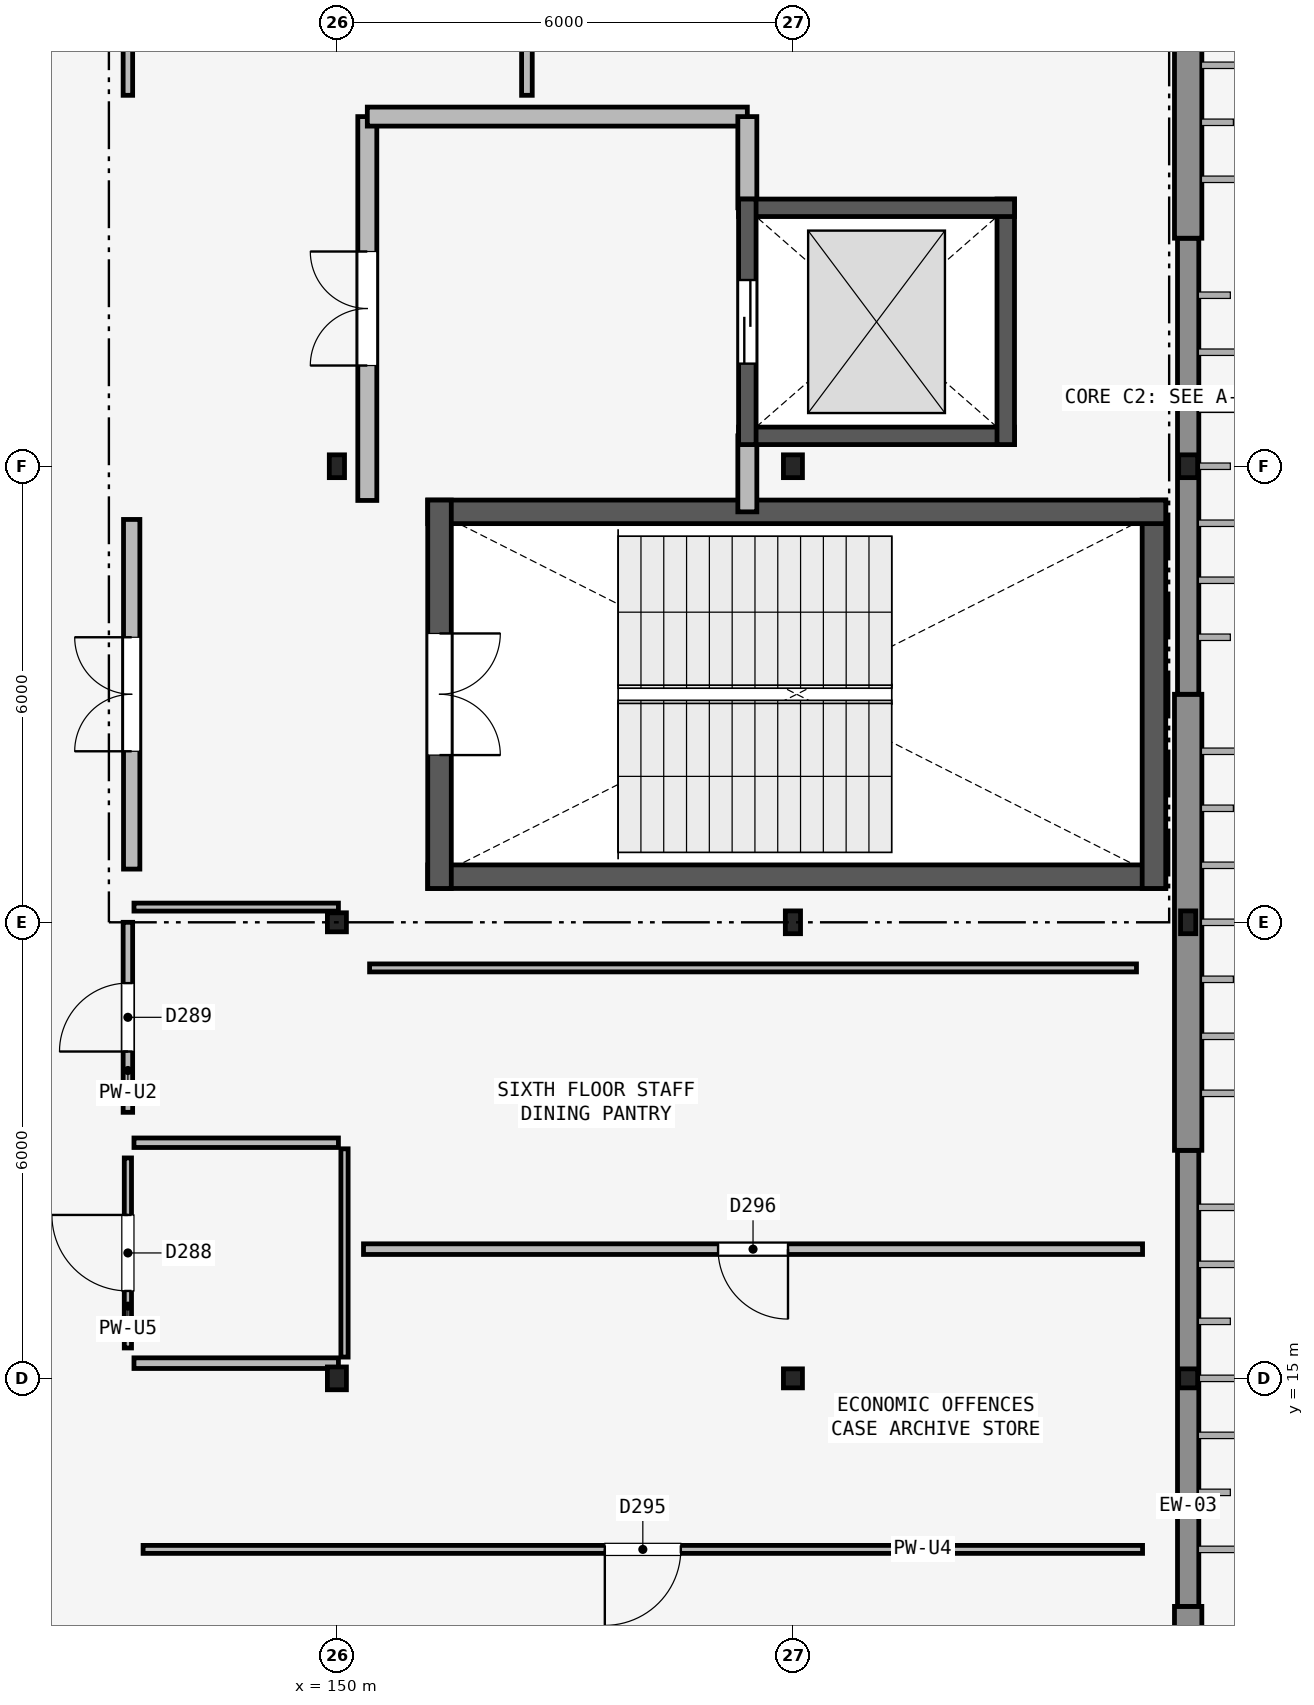
"""IFC4 building model, lengths in metres.
Left out: names, types, materials, properties, quantities, classifications, styles, units other than length and angle.
Written with IfcOpenShell. Run it as: python <this file> out.ifc"""

import sys

from ifc_helpers import new_model, si_unit, direction, frame, frame_2d, origin, origin_2d, place, context, subcontext, project, spatial, rectangle, hollow_rectangle, i_section, extrude, element, fill, save


model = new_model("IFC4")
c1 = context("Model", 3, precision=1e-05, world=origin(), true_north=direction((0.0, 1.0)))
c2 = subcontext(c1, "Body", "Model", "MODEL_VIEW")
j1 = project(units=[si_unit("LENGTHUNIT", "METRE"), si_unit("PLANEANGLEUNIT", "RADIAN")], contexts=[c1])
p1 = place(None, origin())
s1 = spatial("IfcSite", under=j1, at=p1, CompositionType="ELEMENT")
p2 = place(p1, origin())
s2 = spatial("IfcBuilding", under=s1, at=p2, CompositionType="ELEMENT")
p3 = place(p2, frame((0.0, 0.0, 26.1)))
s3 = spatial("IfcBuildingStorey", under=s2, at=p3, CompositionType="ELEMENT", Elevation=26.1)
p4 = place(p3, frame((150.0, 15.0, 0.0), z_axis=(0.0, 0.0, 1.0), x_axis=(1.0, 0.0, 0.0)))
e1 = element("IfcColumn", 1, at=p4, inside=s3, PredefinedType="COLUMN", context=c2, shape_type="SweptSolid", body=[
    extrude(i_section(OverallWidth=0.25, OverallDepth=0.3, WebThickness=0.01, FlangeThickness=0.01, FilletRadius=0.012, at=origin_2d()), origin(), (0.0, 0.0, 1.0), 3.9),
])
p5 = place(p3, frame((150.0, 21.0, 0.0), z_axis=(0.0, 0.0, 1.0), x_axis=(1.0, 0.0, 0.0)))
e2 = element("IfcColumn", 2, at=p5, inside=s3, PredefinedType="COLUMN", context=c2, shape_type="SweptSolid", body=[
    extrude(hollow_rectangle(XDim=0.25, YDim=0.25, WallThickness=0.012, InnerFilletRadius=0.012, OuterFilletRadius=0.024, at=origin_2d()), origin(), (0.0, 0.0, 1.0), 3.9),
])
p6 = place(p3, frame((150.0, 27.0, 0.0), z_axis=(0.0, 0.0, 1.0), x_axis=(1.0, 0.0, 0.0)))
e3 = element("IfcColumn", 3, at=p6, inside=s3, PredefinedType="COLUMN", context=c2, shape_type="SweptSolid", body=[
    extrude(hollow_rectangle(XDim=0.2, YDim=0.3, WallThickness=0.012, InnerFilletRadius=0.012, OuterFilletRadius=0.024, at=origin_2d()), origin(), (0.0, 0.0, 1.0), 3.9),
])
p7 = place(p3, frame((156.0, 15.0, 0.0), z_axis=(0.0, 0.0, 1.0), x_axis=(1.0, 0.0, 0.0)))
e4 = element("IfcColumn", 4, at=p7, inside=s3, PredefinedType="COLUMN", context=c2, shape_type="SweptSolid", body=[
    extrude(hollow_rectangle(XDim=0.25, YDim=0.25, WallThickness=0.012, InnerFilletRadius=0.012, OuterFilletRadius=0.024, at=origin_2d()), origin(), (0.0, 0.0, 1.0), 3.9),
])
p8 = place(p3, frame((156.0, 21.0, 0.0), z_axis=(0.0, 0.0, 1.0), x_axis=(1.0, 0.0, 0.0)))
e5 = element("IfcColumn", 5, at=p8, inside=s3, PredefinedType="COLUMN", context=c2, shape_type="SweptSolid", body=[
    extrude(hollow_rectangle(XDim=0.2, YDim=0.3, WallThickness=0.012, InnerFilletRadius=0.012, OuterFilletRadius=0.024, at=origin_2d()), origin(), (0.0, 0.0, 1.0), 3.9),
])
p9 = place(p3, frame((156.0, 27.0, 0.0), z_axis=(0.0, 0.0, 1.0), x_axis=(1.0, 0.0, 0.0)))
e6 = element("IfcColumn", 6, at=p9, inside=s3, PredefinedType="COLUMN", context=c2, shape_type="SweptSolid", body=[
    extrude(i_section(OverallWidth=0.25, OverallDepth=0.3, WebThickness=0.01, FlangeThickness=0.01, FilletRadius=0.012, at=origin_2d()), origin(), (0.0, 0.0, 1.0), 3.9),
])
p10 = place(p3, frame((161.2, 15.0, 0.0), z_axis=(0.0, 0.0, 1.0), x_axis=(1.0, 0.0, 0.0)))
e7 = element("IfcColumn", 7, at=p10, inside=s3, PredefinedType="COLUMN", context=c2, shape_type="SweptSolid", body=[
    extrude(hollow_rectangle(XDim=0.25, YDim=0.25, WallThickness=0.012, InnerFilletRadius=0.012, OuterFilletRadius=0.024, at=origin_2d()), origin(), (0.0, 0.0, 1.0), 3.9),
])
p11 = place(p3, frame((161.2, 21.0, 0.0), z_axis=(0.0, 0.0, 1.0), x_axis=(1.0, 0.0, 0.0)))
e8 = element("IfcColumn", 8, at=p11, inside=s3, PredefinedType="COLUMN", context=c2, shape_type="SweptSolid", body=[
    extrude(hollow_rectangle(XDim=0.2, YDim=0.3, WallThickness=0.012, InnerFilletRadius=0.012, OuterFilletRadius=0.024, at=origin_2d()), origin(), (0.0, 0.0, 1.0), 3.9),
])
p12 = place(p3, frame((161.2, 27.0, 0.0), z_axis=(0.0, 0.0, 1.0), x_axis=(1.0, 0.0, 0.0)))
e9 = element("IfcColumn", 9, at=p12, inside=s3, PredefinedType="COLUMN", context=c2, shape_type="SweptSolid", body=[
    extrude(i_section(OverallWidth=0.25, OverallDepth=0.3, WebThickness=0.01, FlangeThickness=0.01, FilletRadius=0.012, at=origin_2d()), origin(), (0.0, 0.0, 1.0), 3.9),
])
p13 = place(p3, frame((161.2, 6.0, 0.0), z_axis=(0.0, 0.0, 1.0), x_axis=(0.0, 1.0, 0.0)))
e10 = element("IfcWall", 10, at=p13, inside=s3, PredefinedType="SOLIDWALL", context=c2, shape_type="SweptSolid", body=[
    extrude(rectangle(XDim=6.0, YDim=0.36, at=frame_2d((3.0, 0.0))), origin(), (0.0, 0.0, 1.0), 3.13),
])
p14 = place(p3, frame((161.2, 12.0, 0.0), z_axis=(0.0, 0.0, 1.0), x_axis=(0.0, 1.0, 0.0)))
e11 = element("IfcWall", 11, at=p14, inside=s3, PredefinedType="SOLIDWALL", context=c2, shape_type="SweptSolid", body=[
    extrude(rectangle(XDim=6.0, YDim=0.28, at=frame_2d((3.0, 0.0))), origin(), (0.0, 0.0, 1.0), 3.13),
])
p15 = place(p3, frame((161.2, 18.0, 0.0), z_axis=(0.0, 0.0, 1.0), x_axis=(0.0, 1.0, 0.0)))
e12 = element("IfcWall", 12, at=p15, inside=s3, PredefinedType="SOLIDWALL", context=c2, shape_type="SweptSolid", body=[
    extrude(rectangle(XDim=6.0, YDim=0.36, at=frame_2d((3.0, 0.0))), origin(), (0.0, 0.0, 1.0), 3.13),
])
p16 = place(p3, frame((161.2, 24.0, 0.0), z_axis=(0.0, 0.0, 1.0), x_axis=(0.0, 1.0, 0.0)))
e13 = element("IfcWall", 13, at=p16, inside=s3, PredefinedType="SOLIDWALL", context=c2, shape_type="SweptSolid", body=[
    extrude(rectangle(XDim=6.0, YDim=0.28, at=frame_2d((3.0, 0.0))), origin(), (0.0, 0.0, 1.0), 3.13),
])
p17 = place(p3, frame((161.2, 30.0, 0.0), z_axis=(0.0, 0.0, 1.0), x_axis=(0.0, 1.0, 0.0)))
e14 = element("IfcWall", 14, at=p17, inside=s3, PredefinedType="SOLIDWALL", context=c2, shape_type="SweptSolid", body=[
    extrude(rectangle(XDim=3.8, YDim=0.36, at=frame_2d((1.9, 0.0))), origin(), (0.0, 0.0, 1.0), 3.13),
])
p18 = place(p3, frame((151.195, 21.6, 0.0), z_axis=(0.0, 0.0, 1.0), x_axis=(1.0, 0.0, 0.0)))
e15 = element("IfcWall", 15, at=p18, inside=s3, PredefinedType="SHEAR", context=c2, shape_type="SweptSolid", body=[
    extrude(rectangle(XDim=9.71, YDim=0.31, at=frame_2d((4.855, 0.0))), origin(), (0.0, 0.0, 1.0), 3.76),
])
p19 = place(p3, frame((160.75, 21.445, 0.0), z_axis=(0.0, 0.0, 1.0), x_axis=(0.0, 1.0, 0.0)))
e16 = element("IfcWall", 16, at=p19, inside=s3, PredefinedType="SHEAR", context=c2, shape_type="SweptSolid", body=[
    extrude(rectangle(XDim=5.11, YDim=0.31, at=frame_2d((2.555, 0.0))), origin(), (0.0, 0.0, 1.0), 3.76),
])
p20 = place(p3, frame((160.905, 26.4, 0.0), z_axis=(0.0, 0.0, 1.0), x_axis=(-1.0, 0.0, 0.0)))
e17 = element("IfcWall", 17, at=p20, inside=s3, PredefinedType="SHEAR", context=c2, shape_type="SweptSolid", body=[
    extrude(rectangle(XDim=9.71, YDim=0.31, at=frame_2d((4.855, 0.0))), origin(), (0.0, 0.0, 1.0), 3.76),
])
p21 = place(p3, frame((151.35, 26.555, 0.0), z_axis=(0.0, 0.0, 1.0), x_axis=(0.0, -1.0, 0.0)))
e18 = element("IfcWall", 18, at=p21, inside=s3, PredefinedType="SHEAR", context=c2, shape_type="SweptSolid", body=[
    extrude(rectangle(XDim=5.11, YDim=0.31, at=frame_2d((2.555, 0.0))), origin(), (0.0, 0.0, 1.0), 3.76),
])
p22 = place(p21, frame((1.755, 0.0, 0.0)))
e19 = element("IfcOpeningElement", 19, at=p22, cuts=e18, PredefinedType="OPENING", context=c2, shape_type="SweptSolid", body=[
    extrude(rectangle(XDim=1.6, YDim=2.2, at=frame_2d((0.8, 1.1))), frame((0.0, 0.165, 0.0), z_axis=(0.0, -1.0, 0.0), x_axis=(1.0, 0.0, 0.0)), (0.0, 0.0, 1.0), 0.33),
])
p23 = place(p3, frame((147.3, 21.7, 0.0), z_axis=(0.0, 0.0, 1.0), x_axis=(0.0, 1.0, 0.0)))
e20 = element("IfcWall", 20, at=p23, inside=s3, PredefinedType="PARTITIONING", context=c2, shape_type="SweptSolid", body=[
    extrude(rectangle(XDim=4.6, YDim=0.215, at=frame_2d((2.3, 0.0))), origin(), (0.0, 0.0, 1.0), 3.68),
])
p24 = place(p23, frame((1.55, 0.0, 0.0)))
e21 = element("IfcOpeningElement", 21, at=p24, cuts=e20, PredefinedType="OPENING", context=c2, shape_type="SweptSolid", body=[
    extrude(rectangle(XDim=1.5, YDim=2.15, at=frame_2d((0.75, 1.075))), frame((0.0, 0.117, 0.0), z_axis=(0.0, -1.0, 0.0), x_axis=(1.0, 0.0, 0.0)), (0.0, 0.0, 1.0), 0.235),
])
p25 = place(p3, frame((150.4, 26.55, 0.0), z_axis=(0.0, 0.0, 1.0), x_axis=(0.0, 1.0, 0.0)))
e22 = element("IfcWall", 22, at=p25, inside=s3, PredefinedType="PARTITIONING", context=c2, shape_type="SweptSolid", body=[
    extrude(rectangle(XDim=5.05, YDim=0.25, at=frame_2d((2.525, 0.0))), origin(), (0.0, 0.0, 1.0), 3.08),
])
p26 = place(p25, frame((1.775, 0.0, 0.0)))
e23 = element("IfcOpeningElement", 23, at=p26, cuts=e22, PredefinedType="OPENING", context=c2, shape_type="SweptSolid", body=[
    extrude(rectangle(XDim=1.5, YDim=2.15, at=frame_2d((0.75, 1.075))), frame((0.0, 0.135, 0.0), z_axis=(0.0, -1.0, 0.0), x_axis=(1.0, 0.0, 0.0)), (0.0, 0.0, 1.0), 0.27),
])
p27 = place(p3, frame((150.4, 31.6, 0.0), z_axis=(0.0, 0.0, 1.0), x_axis=(1.0, 0.0, 0.0)))
e24 = element("IfcWall", 24, at=p27, inside=s3, PredefinedType="PARTITIONING", context=c2, shape_type="SweptSolid", body=[
    extrude(rectangle(XDim=5.0, YDim=0.25, at=frame_2d((2.5, 0.0))), origin(), (0.0, 0.0, 1.0), 3.28),
])
p28 = place(p3, frame((155.4, 30.4, 0.0), z_axis=(0.0, 0.0, 1.0), x_axis=(0.0, 1.0, 0.0)))
e25 = element("IfcWall", 25, at=p28, inside=s3, PredefinedType="PARTITIONING", context=c2, shape_type="SweptSolid", body=[
    extrude(rectangle(XDim=1.2, YDim=0.25, at=frame_2d((0.6, 0.0))), origin(), (0.0, 0.0, 1.0), 3.68),
])
p29 = place(p3, frame((155.4, 26.4, 0.0), z_axis=(0.0, 0.0, 1.0), x_axis=(0.0, 1.0, 0.0)))
e26 = element("IfcWall", 26, at=p29, inside=s3, PredefinedType="PARTITIONING", context=c2, shape_type="SweptSolid", body=[
    extrude(rectangle(XDim=1.0, YDim=0.25, at=frame_2d((0.5, 0.0))), origin(), (0.0, 0.0, 1.0), 3.08),
])
p30 = place(p3, frame((155.285, 27.4, 0.0), z_axis=(0.0, 0.0, 1.0), x_axis=(1.0, 0.0, 0.0)))
e27 = element("IfcWall", 27, at=p30, inside=s3, PredefinedType="SHEAR", context=c2, shape_type="SweptSolid", body=[
    extrude(rectangle(XDim=3.63, YDim=0.23, at=frame_2d((1.815, 0.0))), origin(), (0.0, 0.0, 1.0), 3.9),
])
p31 = place(p3, frame((158.8, 27.285, 0.0), z_axis=(0.0, 0.0, 1.0), x_axis=(0.0, 1.0, 0.0)))
e28 = element("IfcWall", 28, at=p31, inside=s3, PredefinedType="SHEAR", context=c2, shape_type="SweptSolid", body=[
    extrude(rectangle(XDim=3.23, YDim=0.23, at=frame_2d((1.615, 0.0))), origin(), (0.0, 0.0, 1.0), 3.9),
])
p32 = place(p3, frame((158.915, 30.4, 0.0), z_axis=(0.0, 0.0, 1.0), x_axis=(-1.0, 0.0, 0.0)))
e29 = element("IfcWall", 29, at=p32, inside=s3, PredefinedType="SHEAR", context=c2, shape_type="SweptSolid", body=[
    extrude(rectangle(XDim=3.63, YDim=0.23, at=frame_2d((1.815, 0.0))), origin(), (0.0, 0.0, 1.0), 3.9),
])
p33 = place(p3, frame((155.4, 30.515, 0.0), z_axis=(0.0, 0.0, 1.0), x_axis=(0.0, -1.0, 0.0)))
e30 = element("IfcWall", 30, at=p33, inside=s3, PredefinedType="SHEAR", context=c2, shape_type="SweptSolid", body=[
    extrude(rectangle(XDim=3.23, YDim=0.23, at=frame_2d((1.615, 0.0))), origin(), (0.0, 0.0, 1.0), 3.9),
])
p34 = place(p33, frame((1.065, 0.0, 0.0)))
e31 = element("IfcOpeningElement", 31, at=p34, cuts=e30, PredefinedType="OPENING", context=c2, shape_type="SweptSolid", body=[
    extrude(rectangle(XDim=1.1, YDim=2.2, at=frame_2d((0.55, 1.1))), frame((0.0, 0.125, 0.0), z_axis=(0.0, -1.0, 0.0), x_axis=(1.0, 0.0, 0.0)), (0.0, 0.0, 1.0), 0.25),
])
p35 = place(p3, frame((147.25, 15.4, 0.0), z_axis=(0.0, 0.0, 1.0), x_axis=(0.0, 1.0, 0.0)))
e32 = element("IfcWall", 32, at=p35, inside=s3, PredefinedType="PARTITIONING", context=c2, shape_type="SweptSolid", body=[
    extrude(rectangle(XDim=2.5, YDim=0.095, at=frame_2d((1.25, 0.0))), origin(), (0.0, 0.0, 1.0), 3.68),
])
p36 = place(p35, frame((0.75, 0.0, 0.0)))
e33 = element("IfcOpeningElement", 33, at=p36, cuts=e32, PredefinedType="OPENING", context=c2, shape_type="SweptSolid", body=[
    extrude(rectangle(XDim=1.0, YDim=2.1, at=frame_2d((0.5, 1.05))), frame((0.0, 0.057, 0.0), z_axis=(0.0, -1.0, 0.0), x_axis=(1.0, 0.0, 0.0)), (0.0, 0.0, 1.0), 0.115),
])
p37 = place(p3, frame((147.25, 18.5, 0.0), z_axis=(0.0, 0.0, 1.0), x_axis=(0.0, 1.0, 0.0)))
e34 = element("IfcWall", 34, at=p37, inside=s3, PredefinedType="PARTITIONING", context=c2, shape_type="SweptSolid", body=[
    extrude(rectangle(XDim=2.5, YDim=0.125, at=frame_2d((1.25, 0.0))), origin(), (0.0, 0.0, 1.0), 3.18),
])
p38 = place(p37, frame((0.8, 0.0, 0.0)))
e35 = element("IfcOpeningElement", 35, at=p38, cuts=e34, PredefinedType="OPENING", context=c2, shape_type="SweptSolid", body=[
    extrude(rectangle(XDim=0.9, YDim=2.1, at=frame_2d((0.45, 1.05))), frame((0.0, 0.073, 0.0), z_axis=(0.0, -1.0, 0.0), x_axis=(1.0, 0.0, 0.0)), (0.0, 0.0, 1.0), 0.145),
])
p39 = place(p3, frame((160.6, 12.75, 0.0), z_axis=(0.0, 0.0, 1.0), x_axis=(-1.0, 0.0, 0.0)))
e36 = element("IfcWall", 36, at=p39, inside=s3, PredefinedType="PARTITIONING", context=c2, shape_type="SweptSolid", body=[
    extrude(rectangle(XDim=13.15, YDim=0.105, at=frame_2d((6.575, 0.0))), origin(), (0.0, 0.0, 1.0), 3.273),
])
p40 = place(p39, frame((6.075, 0.0, 0.0)))
e37 = element("IfcOpeningElement", 37, at=p40, cuts=e36, PredefinedType="OPENING", context=c2, shape_type="SweptSolid", body=[
    extrude(rectangle(XDim=1.0, YDim=2.15, at=frame_2d((0.5, 1.075))), frame((0.0, 0.062, 0.0), z_axis=(0.0, -1.0, 0.0), x_axis=(1.0, 0.0, 0.0)), (0.0, 0.0, 1.0), 0.125),
])
p41 = place(p3, frame((160.6, 16.7, 0.0), z_axis=(0.0, 0.0, 1.0), x_axis=(-1.0, 0.0, 0.0)))
e38 = element("IfcWall", 38, at=p41, inside=s3, PredefinedType="PARTITIONING", context=c2, shape_type="SweptSolid", body=[
    extrude(rectangle(XDim=10.25, YDim=0.14, at=frame_2d((5.125, 0.0))), origin(), (0.0, 0.0, 1.0), 3.33),
])
p42 = place(p41, frame((4.665, 0.0, 0.0)))
e39 = element("IfcOpeningElement", 39, at=p42, cuts=e38, PredefinedType="OPENING", context=c2, shape_type="SweptSolid", body=[
    extrude(rectangle(XDim=0.92, YDim=2.1, at=frame_2d((0.46, 1.05))), frame((0.0, 0.08, 0.0), z_axis=(0.0, -1.0, 0.0), x_axis=(1.0, 0.0, 0.0)), (0.0, 0.0, 1.0), 0.16),
])
p43 = place(p3, frame((150.1, 18.02, 0.0), z_axis=(0.0, 0.0, 1.0), x_axis=(0.0, -1.0, 0.0)))
e40 = element("IfcWall", 40, at=p43, inside=s3, PredefinedType="PARTITIONING", context=c2, shape_type="SweptSolid", body=[
    extrude(rectangle(XDim=2.74, YDim=0.095, at=frame_2d((1.37, 0.0))), origin(), (0.0, 0.0, 1.0), 3.273),
])
p44 = place(p3, frame((150.02, 15.2, 0.0), z_axis=(0.0, 0.0, 1.0), x_axis=(-1.0, 0.0, 0.0)))
e41 = element("IfcWall", 41, at=p44, inside=s3, PredefinedType="PARTITIONING", context=c2, shape_type="SweptSolid", body=[
    extrude(rectangle(XDim=2.69, YDim=0.14, at=frame_2d((1.345, 0.0))), origin(), (0.0, 0.0, 1.0), 3.08),
])
p45 = place(p3, frame((147.33, 18.1, 0.0), z_axis=(0.0, 0.0, 1.0), x_axis=(1.0, 0.0, 0.0)))
e42 = element("IfcWall", 42, at=p45, inside=s3, PredefinedType="PARTITIONING", context=c2, shape_type="SweptSolid", body=[
    extrude(rectangle(XDim=2.69, YDim=0.125, at=frame_2d((1.345, 0.0))), origin(), (0.0, 0.0, 1.0), 3.356),
])
p46 = place(p3, frame((147.33, 21.2, 0.0), z_axis=(0.0, 0.0, 1.0), x_axis=(1.0, 0.0, 0.0)))
e43 = element("IfcWall", 43, at=p46, inside=s3, PredefinedType="PARTITIONING", context=c2, shape_type="SweptSolid", body=[
    extrude(rectangle(XDim=2.69, YDim=0.105, at=frame_2d((1.345, 0.0))), origin(), (0.0, 0.0, 1.0), 3.08),
])
p47 = place(p3, frame((152.5, 34.67, 0.0), z_axis=(0.0, 0.0, 1.0), x_axis=(0.0, -1.0, 0.0)))
e44 = element("IfcWall", 44, at=p47, inside=s3, PredefinedType="PARTITIONING", context=c2, shape_type="SweptSolid", body=[
    extrude(rectangle(XDim=2.79, YDim=0.14, at=frame_2d((1.395, 0.0))), origin(), (0.0, 0.0, 1.0), 3.08),
])
p48 = place(p3, frame((147.25, 31.88, 0.0), z_axis=(0.0, 0.0, 1.0), x_axis=(0.0, 1.0, 0.0)))
e45 = element("IfcWall", 45, at=p48, inside=s3, PredefinedType="PARTITIONING", context=c2, shape_type="SweptSolid", body=[
    extrude(rectangle(XDim=2.79, YDim=0.125, at=frame_2d((1.395, 0.0))), origin(), (0.0, 0.0, 1.0), 3.18),
])
p49 = place(p3, frame((150.43, 20.4, 0.0), z_axis=(0.0, 0.0, 1.0), x_axis=(1.0, 0.0, 0.0)))
e46 = element("IfcWall", 46, at=p49, inside=s3, PredefinedType="PARTITIONING", context=c2, shape_type="SweptSolid", body=[
    extrude(rectangle(XDim=10.09, YDim=0.105, at=frame_2d((5.045, 0.0))), origin(), (0.0, 0.0, 1.0), 3.33),
])
p50 = place(p22, origin())
e47 = element("IfcDoor", 47, at=p50, inside=s3, OperationType="DOUBLE_DOOR_SINGLE_SWING", PredefinedType="DOOR", context=c2, shape_type="SweptSolid", body=[
    extrude(rectangle(XDim=1.6, YDim=2.2, at=frame_2d((0.8, 1.1))), frame((0.0, 0.025, 0.0), z_axis=(0.0, -1.0, 0.0), x_axis=(1.0, 0.0, 0.0)), (0.0, 0.0, 1.0), 0.05),
])
fill(e19, e47)
p51 = place(p24, origin())
e48 = element("IfcDoor", 48, at=p51, inside=s3, OperationType="DOUBLE_DOOR_SINGLE_SWING", PredefinedType="DOOR", context=c2, shape_type="SweptSolid", body=[
    extrude(rectangle(XDim=1.5, YDim=2.15, at=frame_2d((0.75, 1.075))), frame((0.0, 0.025, 0.0), z_axis=(0.0, -1.0, 0.0), x_axis=(1.0, 0.0, 0.0)), (0.0, 0.0, 1.0), 0.05),
])
fill(e21, e48)
p52 = place(p26, origin())
e49 = element("IfcDoor", 49, at=p52, inside=s3, OperationType="DOUBLE_DOOR_SINGLE_SWING", PredefinedType="DOOR", context=c2, shape_type="SweptSolid", body=[
    extrude(rectangle(XDim=1.5, YDim=2.15, at=frame_2d((0.75, 1.075))), frame((0.0, 0.025, 0.0), z_axis=(0.0, -1.0, 0.0), x_axis=(1.0, 0.0, 0.0)), (0.0, 0.0, 1.0), 0.05),
])
fill(e23, e49)
p53 = place(p34, origin())
e50 = element("IfcDoor", 50, at=p53, inside=s3, OperationType="SLIDING_TO_LEFT", PredefinedType="DOOR", context=c2, shape_type="SweptSolid", body=[
    extrude(rectangle(XDim=1.1, YDim=2.2, at=frame_2d((0.55, 1.1))), frame((0.0, 0.025, 0.0), z_axis=(0.0, -1.0, 0.0), x_axis=(1.0, 0.0, 0.0)), (0.0, 0.0, 1.0), 0.05),
])
fill(e31, e50)
p54 = place(p36, origin())
e51 = element("IfcDoor", 51, at=p54, inside=s3, OperationType="SINGLE_SWING_RIGHT", PredefinedType="DOOR", context=c2, shape_type="SweptSolid", body=[
    extrude(rectangle(XDim=1.0, YDim=2.1, at=frame_2d((0.5, 1.05))), frame((0.0, 0.025, 0.0), z_axis=(0.0, -1.0, 0.0), x_axis=(1.0, 0.0, 0.0)), (0.0, 0.0, 1.0), 0.05),
])
fill(e33, e51)
p55 = place(p38, origin())
e52 = element("IfcDoor", 52, at=p55, inside=s3, OperationType="SINGLE_SWING_LEFT", PredefinedType="DOOR", context=c2, shape_type="SweptSolid", body=[
    extrude(rectangle(XDim=0.9, YDim=2.1, at=frame_2d((0.45, 1.05))), frame((0.0, 0.025, 0.0), z_axis=(0.0, -1.0, 0.0), x_axis=(1.0, 0.0, 0.0)), (0.0, 0.0, 1.0), 0.05),
])
fill(e35, e52)
p56 = place(p40, origin())
e53 = element("IfcDoor", 53, at=p56, inside=s3, OperationType="SINGLE_SWING_RIGHT", PredefinedType="DOOR", context=c2, shape_type="SweptSolid", body=[
    extrude(rectangle(XDim=1.0, YDim=2.15, at=frame_2d((0.5, 1.075))), frame((0.0, 0.025, 0.0), z_axis=(0.0, -1.0, 0.0), x_axis=(1.0, 0.0, 0.0)), (0.0, 0.0, 1.0), 0.05),
])
fill(e37, e53)
p57 = place(p42, origin())
e54 = element("IfcDoor", 54, at=p57, inside=s3, OperationType="SINGLE_SWING_LEFT", PredefinedType="DOOR", context=c2, shape_type="SweptSolid", body=[
    extrude(rectangle(XDim=0.92, YDim=2.1, at=frame_2d((0.46, 1.05))), frame((0.0, 0.025, 0.0), z_axis=(0.0, -1.0, 0.0), x_axis=(1.0, 0.0, 0.0)), (0.0, 0.0, 1.0), 0.05),
])
fill(e39, e54)
save(model, sys.argv[1])
